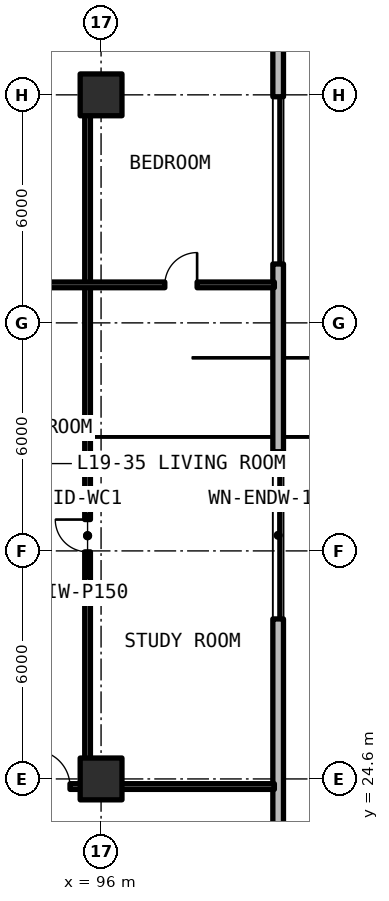
"""IFC4 building model, lengths in metres.
Left out: names, types, materials, properties, quantities, classifications, styles, units other than length and angle.
Written with IfcOpenShell. Run it as: python <this file> out.ifc"""

import sys

from ifc_helpers import new_model, si_unit, direction, frame, frame_2d, origin, origin_2d, place, context, subcontext, project, spatial, rectangle, extrude, element, fill, save


model = new_model("IFC4")
c1 = context("Model", 3, precision=1e-05, world=origin(), true_north=direction((0.0, 1.0)))
c2 = subcontext(c1, "Body", "Model", "MODEL_VIEW")
j1 = project(units=[si_unit("LENGTHUNIT", "METRE"), si_unit("PLANEANGLEUNIT", "RADIAN")], contexts=[c1])
p1 = place(None, origin())
s1 = spatial("IfcSite", under=j1, at=p1, CompositionType="ELEMENT")
p2 = place(p1, origin())
s2 = spatial("IfcBuilding", under=s1, at=p2, CompositionType="ELEMENT")
p3 = place(p2, frame((0.0, 0.0, 69.63)))
s3 = spatial("IfcBuildingStorey", under=s2, at=p3, CompositionType="ELEMENT", Elevation=69.63)
for number, where, z_axis, x_axis in (
    (1, (96.0, 24.6, 0.0), (0.0, 0.0, 1.0), (1.0, 0.0, 0.0)),
    (2, (96.0, 42.6, 0.0), (0.0, 0.0, 1.0), (1.0, 0.0, 0.0)),
):
    element("IfcColumn", number, at=place(p3, frame(where, z_axis=z_axis, x_axis=x_axis)), inside=s3, PredefinedType="COLUMN", context=c2, shape_type="SweptSolid", body=[
        extrude(rectangle(XDim=1.1, YDim=1.1, at=origin_2d()), origin(), (0.0, 0.0, 1.0), 3.63),
    ])
p4 = place(p3, frame((100.66, 11.858, 0.0), z_axis=(0.0, 0.0, 1.0), x_axis=(0.0, 1.0, 0.0)))
e3 = element("IfcWall", 3, at=p4, inside=s3, PredefinedType="SOLIDWALL", context=c2, shape_type="SweptSolid", body=[
    extrude(rectangle(XDim=43.484, YDim=0.28, at=frame_2d((21.742, 0.0))), origin(), (0.0, 0.0, 1.0), 3.35),
])
p5 = place(p4, frame((16.952, 0.0, 0.78)))
e4 = element("IfcOpeningElement", 4, at=p5, cuts=e3, PredefinedType="OPENING", context=c2, shape_type="SweptSolid", body=[
    extrude(rectangle(XDim=4.4, YDim=1.66, at=frame_2d((2.2, 0.83))), frame((0.0, 0.15, 0.0), z_axis=(0.0, -1.0, 0.0), x_axis=(1.0, 0.0, 0.0)), (0.0, 0.0, 1.0), 0.3),
])
p6 = place(p4, frame((26.292, 0.0, 0.78)))
e5 = element("IfcOpeningElement", 5, at=p6, cuts=e3, PredefinedType="OPENING", context=c2, shape_type="SweptSolid", body=[
    extrude(rectangle(XDim=4.4, YDim=1.66, at=frame_2d((2.2, 0.83))), frame((0.0, 0.15, 0.0), z_axis=(0.0, -1.0, 0.0), x_axis=(1.0, 0.0, 0.0)), (0.0, 0.0, 1.0), 0.3),
])
p7 = place(p4, frame((1.511, 0.0, 0.78)))
e6 = element("IfcOpeningElement", 6, at=p7, cuts=e3, PredefinedType="OPENING", context=c2, shape_type="SweptSolid", body=[
    extrude(rectangle(XDim=4.4, YDim=1.66, at=frame_2d((2.2, 0.83))), frame((0.0, 0.15, 0.0), z_axis=(0.0, -1.0, 0.0), x_axis=(1.0, 0.0, 0.0)), (0.0, 0.0, 1.0), 0.3),
])
p8 = place(p3, frame((95.645, 24.4, 0.0), z_axis=(0.0, 0.0, 1.0), x_axis=(0.0, 1.0, 0.0)))
e7 = element("IfcWall", 7, at=p8, inside=s3, PredefinedType="PARTITIONING", context=c2, shape_type="SweptSolid", body=[
    extrude(rectangle(XDim=13.2, YDim=0.15, at=frame_2d((6.6, 0.0))), origin(), (0.0, 0.0, 1.0), 2.57),
])
p9 = place(p8, frame((6.175, 0.0, 0.0)))
e8 = element("IfcOpeningElement", 8, at=p9, cuts=e7, PredefinedType="OPENING", context=c2, shape_type="SweptSolid", body=[
    extrude(rectangle(XDim=0.85, YDim=2.1, at=frame_2d((0.425, 1.05))), frame((0.0, 0.085, 0.0), z_axis=(0.0, -1.0, 0.0), x_axis=(1.0, 0.0, 0.0)), (0.0, 0.0, 1.0), 0.17),
])
p10 = place(p3, frame((95.645, 37.6, 0.0), z_axis=(0.0, 0.0, 1.0), x_axis=(0.0, 1.0, 0.0)))
e9 = element("IfcWall", 9, at=p10, inside=s3, PredefinedType="PARTITIONING", context=c2, shape_type="SweptSolid", body=[
    extrude(rectangle(XDim=5.2, YDim=0.15, at=frame_2d((2.6, 0.0))), origin(), (0.0, 0.0, 1.0), 2.57),
])
p11 = place(p3, frame((90.32, 37.6, 0.0), z_axis=(0.0, 0.0, 1.0), x_axis=(1.0, 0.0, 0.0)))
e10 = element("IfcWall", 10, at=p11, inside=s3, PredefinedType="PARTITIONING", context=c2, shape_type="SweptSolid", body=[
    extrude(rectangle(XDim=10.24, YDim=0.15, at=frame_2d((5.12, 0.0))), origin(), (0.0, 0.0, 1.0), 2.57),
])
p12 = place(p11, frame((3.412, 0.0, 0.0)))
e11 = element("IfcOpeningElement", 11, at=p12, cuts=e10, PredefinedType="OPENING", context=c2, shape_type="SweptSolid", body=[
    extrude(rectangle(XDim=0.85, YDim=2.1, at=frame_2d((0.425, 1.05))), frame((0.0, 0.085, 0.0), z_axis=(0.0, -1.0, 0.0), x_axis=(1.0, 0.0, 0.0)), (0.0, 0.0, 1.0), 0.17),
])
p13 = place(p11, frame((7.357, 0.0, 0.0)))
e12 = element("IfcOpeningElement", 12, at=p13, cuts=e10, PredefinedType="OPENING", context=c2, shape_type="SweptSolid", body=[
    extrude(rectangle(XDim=0.85, YDim=2.1, at=frame_2d((0.425, 1.05))), frame((0.0, 0.085, 0.0), z_axis=(0.0, -1.0, 0.0), x_axis=(1.0, 0.0, 0.0)), (0.0, 0.0, 1.0), 0.17),
])
p14 = place(p3, frame((90.32, 24.4, 0.0), z_axis=(0.0, 0.0, 1.0), x_axis=(1.0, 0.0, 0.0)))
e13 = element("IfcWall", 13, at=p14, inside=s3, PredefinedType="SOLIDWALL", context=c2, shape_type="SweptSolid", body=[
    extrude(rectangle(XDim=10.24, YDim=0.15, at=frame_2d((5.12, 0.0))), origin(), (0.0, 0.0, 1.0), 2.565),
])
p15 = place(p14, frame((3.913, 0.0, 0.0)))
e14 = element("IfcOpeningElement", 14, at=p15, cuts=e13, PredefinedType="OPENING", context=c2, shape_type="SweptSolid", body=[
    extrude(rectangle(XDim=0.95, YDim=2.15, at=frame_2d((0.475, 1.075))), frame((0.0, 0.085, 0.0), z_axis=(0.0, -1.0, 0.0), x_axis=(1.0, 0.0, 0.0)), (0.0, 0.0, 1.0), 0.17),
])
p16 = place(p5, origin())
e15 = element("IfcWindow", 15, at=p16, inside=s3, PartitioningType="SINGLE_PANEL", PredefinedType="WINDOW", context=c2, shape_type="SweptSolid", body=[
    extrude(rectangle(XDim=4.4, YDim=1.66, at=frame_2d((2.2, 0.83))), frame((0.0, 0.03, 0.0), z_axis=(0.0, -1.0, 0.0), x_axis=(1.0, 0.0, 0.0)), (0.0, 0.0, 1.0), 0.06),
])
fill(e4, e15)
p17 = place(p6, origin())
e16 = element("IfcWindow", 16, at=p17, inside=s3, PartitioningType="SINGLE_PANEL", PredefinedType="WINDOW", context=c2, shape_type="SweptSolid", body=[
    extrude(rectangle(XDim=4.4, YDim=1.66, at=frame_2d((2.2, 0.83))), frame((0.0, 0.03, 0.0), z_axis=(0.0, -1.0, 0.0), x_axis=(1.0, 0.0, 0.0)), (0.0, 0.0, 1.0), 0.06),
])
fill(e5, e16)
p18 = place(p9, origin())
e17 = element("IfcDoor", 17, at=p18, inside=s3, OperationType="SINGLE_SWING_RIGHT", PredefinedType="DOOR", context=c2, shape_type="SweptSolid", body=[
    extrude(rectangle(XDim=0.85, YDim=2.1, at=frame_2d((0.425, 1.05))), frame((0.0, 0.025, 0.0), z_axis=(0.0, -1.0, 0.0), x_axis=(1.0, 0.0, 0.0)), (0.0, 0.0, 1.0), 0.05),
])
fill(e8, e17)
p19 = place(p13, origin())
e18 = element("IfcDoor", 18, at=p19, inside=s3, OperationType="SINGLE_SWING_RIGHT", PredefinedType="DOOR", context=c2, shape_type="SweptSolid", body=[
    extrude(rectangle(XDim=0.85, YDim=2.1, at=frame_2d((0.425, 1.05))), frame((0.0, 0.025, 0.0), z_axis=(0.0, -1.0, 0.0), x_axis=(1.0, 0.0, 0.0)), (0.0, 0.0, 1.0), 0.05),
])
fill(e12, e18)
p20 = place(p15, origin())
e19 = element("IfcDoor", 19, at=p20, inside=s3, OperationType="SINGLE_SWING_LEFT", PredefinedType="DOOR", context=c2, shape_type="SweptSolid", body=[
    extrude(rectangle(XDim=0.95, YDim=2.15, at=frame_2d((0.475, 1.075))), frame((0.0, 0.025, 0.0), z_axis=(0.0, -1.0, 0.0), x_axis=(1.0, 0.0, 0.0)), (0.0, 0.0, 1.0), 0.05),
])
fill(e14, e19)
save(model, sys.argv[1])
